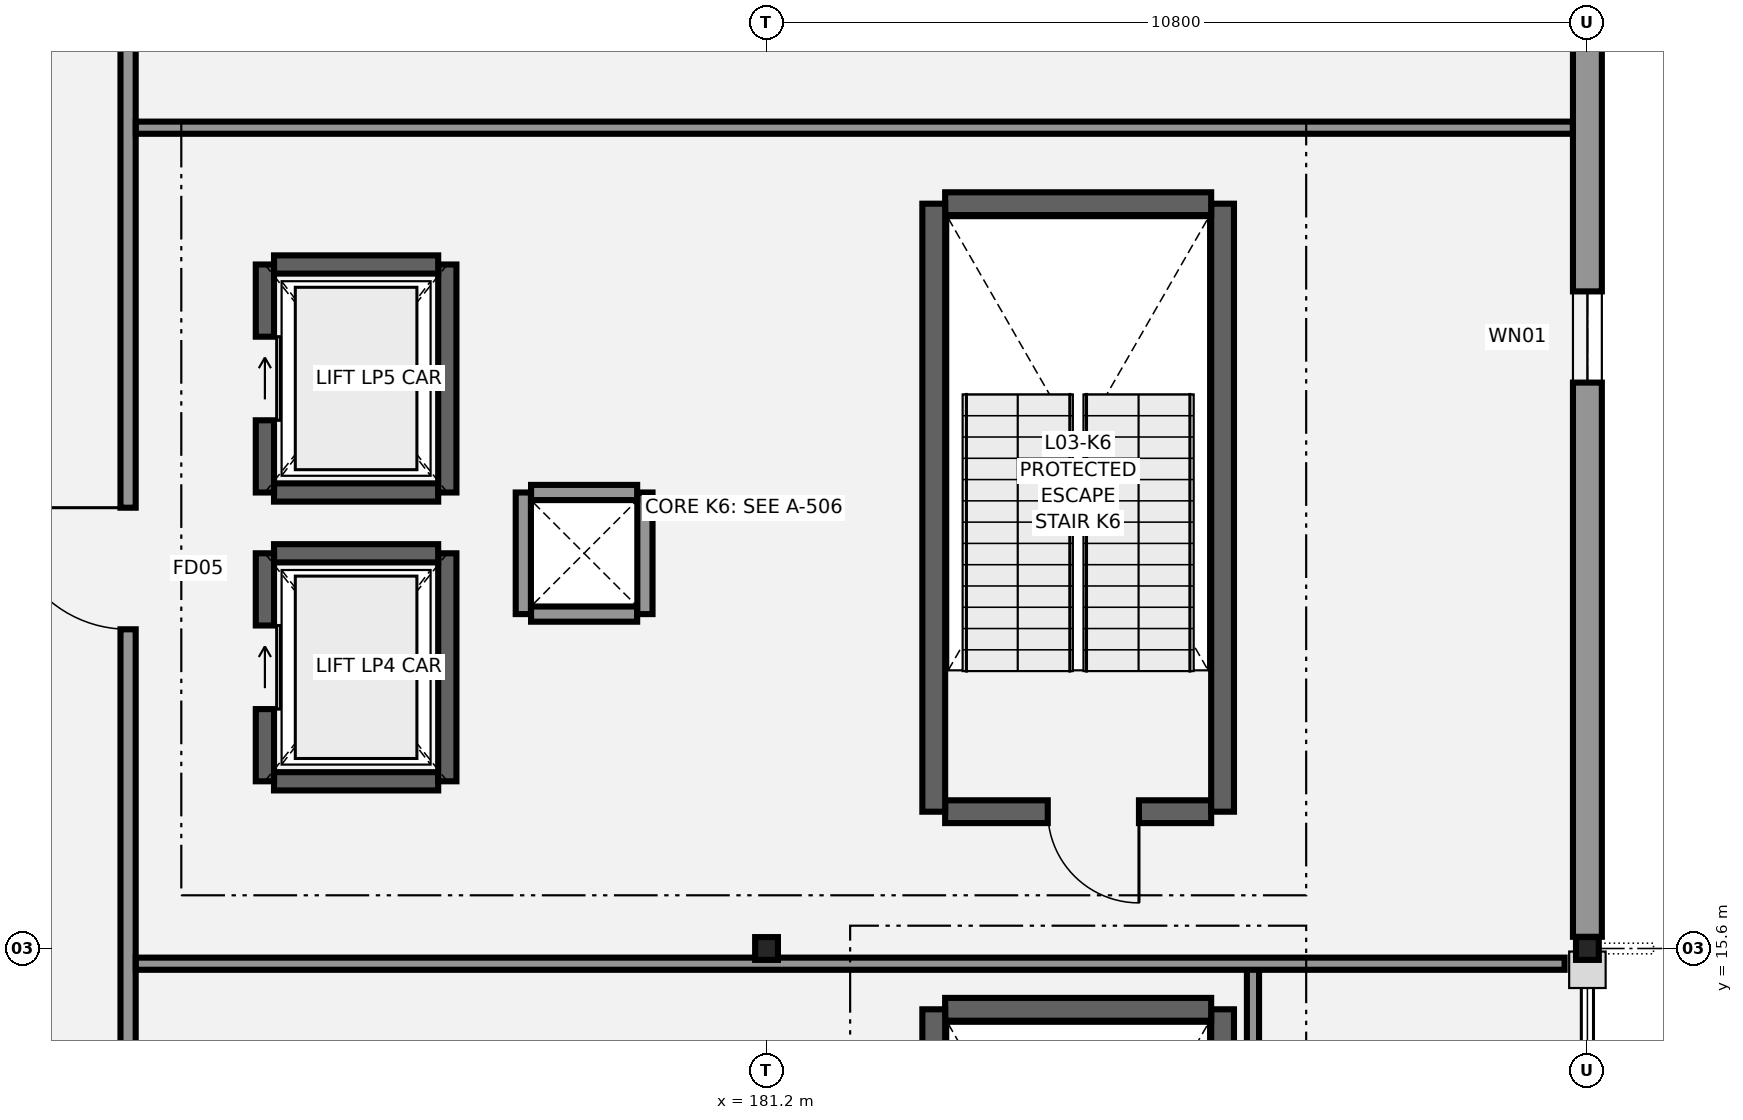
"""IFC4 building model, lengths in metres.
Left out: names, types, materials, properties, quantities, classifications, styles, units other than length and angle.
Written with IfcOpenShell. Run it as: python <this file> out.ifc"""

import sys

from ifc_helpers import new_model, si_unit, direction, frame, frame_2d, origin, origin_2d, place, context, subcontext, project, spatial, rectangle, i_section, extrude, element, fill, save


model = new_model("IFC4")
c1 = context("Model", 3, precision=1e-05, world=origin(), true_north=direction((0.0, 1.0)))
c2 = subcontext(c1, "Body", "Model", "MODEL_VIEW")
j1 = project(units=[si_unit("LENGTHUNIT", "METRE"), si_unit("PLANEANGLEUNIT", "RADIAN")], contexts=[c1])
p1 = place(None, origin())
s1 = spatial("IfcSite", under=j1, at=p1, CompositionType="ELEMENT")
p2 = place(p1, origin())
s2 = spatial("IfcBuilding", under=s1, at=p2, CompositionType="ELEMENT")
p3 = place(p2, frame((0.0, 0.0, 14.4)))
s3 = spatial("IfcBuildingStorey", under=s2, at=p3, CompositionType="ELEMENT", Elevation=14.4)
for number, where, z_axis, x_axis in (
    (1, (181.2, 15.6, 0.0), (0.0, 0.0, 1.0), (1.0, 0.0, 0.0)),
    (2, (192.0, 15.6, 0.0), (0.0, 0.0, 1.0), (1.0, 0.0, 0.0)),
):
    element("IfcColumn", number, at=place(p3, frame(where, z_axis=z_axis, x_axis=x_axis)), inside=s3, PredefinedType="COLUMN", context=c2, shape_type="SweptSolid", body=[
        extrude(i_section(OverallWidth=0.3, OverallDepth=0.3, WebThickness=0.011, FlangeThickness=0.019, FilletRadius=0.027, at=origin_2d()), origin(), (0.0, 0.0, 1.0), 4.2),
    ])
p4 = place(p3, frame((187.2, 6.8, 0.0), z_axis=(0.0, 0.0, 1.0), x_axis=(0.0, 1.0, 0.0)))
e3 = element("IfcWall", 3, at=p4, inside=s3, PredefinedType="SHEAR", context=c2, shape_type="SweptSolid", body=[
    extrude(rectangle(XDim=8.0, YDim=0.3, at=frame_2d((4.0, 0.0))), origin(), (0.0, 0.0, 1.0), 3.98),
])
p5 = place(p3, frame((187.05, 14.8, 0.0), z_axis=(0.0, 0.0, 1.0), x_axis=(-1.0, 0.0, 0.0)))
e4 = element("IfcWall", 4, at=p5, inside=s3, PredefinedType="SHEAR", context=c2, shape_type="SweptSolid", body=[
    extrude(rectangle(XDim=3.5, YDim=0.3, at=frame_2d((1.75, 0.0))), origin(), (0.0, 0.0, 1.0), 3.98),
])
p6 = place(p3, frame((183.4, 14.8, 0.0), z_axis=(0.0, 0.0, 1.0), x_axis=(0.0, -1.0, 0.0)))
e5 = element("IfcWall", 5, at=p6, inside=s3, PredefinedType="SHEAR", context=c2, shape_type="SweptSolid", body=[
    extrude(rectangle(XDim=8.0, YDim=0.3, at=frame_2d((4.0, 0.0))), origin(), (0.0, 0.0, 1.0), 3.98),
])
p7 = place(p3, frame((187.05, 17.4, 0.0), z_axis=(0.0, 0.0, 1.0), x_axis=(-1.0, 0.0, 0.0)))
e6 = element("IfcWall", 6, at=p7, inside=s3, PredefinedType="SHEAR", context=c2, shape_type="SweptSolid", body=[
    extrude(rectangle(XDim=3.5, YDim=0.3, at=frame_2d((1.75, 0.0))), origin(), (0.0, 0.0, 1.0), 3.98),
])
p8 = place(p7, frame((0.95, 0.0, 0.0)))
e7 = element("IfcOpeningElement", 7, at=p8, cuts=e6, PredefinedType="OPENING", context=c2, shape_type="SweptSolid", body=[
    extrude(rectangle(XDim=1.2, YDim=2.2, at=frame_2d((0.6, 1.1))), frame((0.0, 0.16, 0.0), z_axis=(0.0, -1.0, 0.0), x_axis=(1.0, 0.0, 0.0)), (0.0, 0.0, 1.0), 0.32),
])
p9 = place(p3, frame((187.2, 17.4, 0.0), z_axis=(0.0, 0.0, 1.0), x_axis=(0.0, 1.0, 0.0)))
e8 = element("IfcWall", 8, at=p9, inside=s3, PredefinedType="SHEAR", context=c2, shape_type="SweptSolid", body=[
    extrude(rectangle(XDim=8.0, YDim=0.3, at=frame_2d((4.0, 0.0))), origin(), (0.0, 0.0, 1.0), 3.98),
])
p10 = place(p3, frame((187.05, 25.4, 0.0), z_axis=(0.0, 0.0, 1.0), x_axis=(-1.0, 0.0, 0.0)))
e9 = element("IfcWall", 9, at=p10, inside=s3, PredefinedType="SHEAR", context=c2, shape_type="SweptSolid", body=[
    extrude(rectangle(XDim=3.5, YDim=0.3, at=frame_2d((1.75, 0.0))), origin(), (0.0, 0.0, 1.0), 3.98),
])
p11 = place(p3, frame((183.4, 25.4, 0.0), z_axis=(0.0, 0.0, 1.0), x_axis=(0.0, -1.0, 0.0)))
e10 = element("IfcWall", 10, at=p11, inside=s3, PredefinedType="SHEAR", context=c2, shape_type="SweptSolid", body=[
    extrude(rectangle(XDim=8.0, YDim=0.3, at=frame_2d((4.0, 0.0))), origin(), (0.0, 0.0, 1.0), 3.98),
])
p12 = place(p3, frame((174.72, 17.8, 0.0), z_axis=(0.0, 0.0, 1.0), x_axis=(1.0, 0.0, 0.0)))
e11 = element("IfcWall", 11, at=p12, inside=s3, PredefinedType="SHEAR", context=c2, shape_type="SweptSolid", body=[
    extrude(rectangle(XDim=2.16, YDim=0.24, at=frame_2d((1.08, 0.0))), origin(), (0.0, 0.0, 1.0), 3.98),
])
p13 = place(p3, frame((177.0, 17.8, 0.0), z_axis=(0.0, 0.0, 1.0), x_axis=(0.0, 1.0, 0.0)))
e12 = element("IfcWall", 12, at=p13, inside=s3, PredefinedType="SHEAR", context=c2, shape_type="SweptSolid", body=[
    extrude(rectangle(XDim=3.0, YDim=0.24, at=frame_2d((1.5, 0.0))), origin(), (0.0, 0.0, 1.0), 3.98),
])
p14 = place(p3, frame((176.88, 20.8, 0.0), z_axis=(0.0, 0.0, 1.0), x_axis=(-1.0, 0.0, 0.0)))
e13 = element("IfcWall", 13, at=p14, inside=s3, PredefinedType="SHEAR", context=c2, shape_type="SweptSolid", body=[
    extrude(rectangle(XDim=2.16, YDim=0.24, at=frame_2d((1.08, 0.0))), origin(), (0.0, 0.0, 1.0), 3.98),
])
p15 = place(p3, frame((174.6, 20.8, 0.0), z_axis=(0.0, 0.0, 1.0), x_axis=(0.0, -1.0, 0.0)))
e14 = element("IfcWall", 14, at=p15, inside=s3, PredefinedType="SHEAR", context=c2, shape_type="SweptSolid", body=[
    extrude(rectangle(XDim=3.0, YDim=0.24, at=frame_2d((1.5, 0.0))), origin(), (0.0, 0.0, 1.0), 3.98),
])
p16 = place(p15, frame((0.95, 0.0, 0.0)))
e15 = element("IfcOpeningElement", 15, at=p16, cuts=e14, PredefinedType="OPENING", context=c2, shape_type="SweptSolid", body=[
    extrude(rectangle(XDim=1.1, YDim=2.1, at=frame_2d((0.55, 1.05))), frame((0.0, 0.13, 0.0), z_axis=(0.0, -1.0, 0.0), x_axis=(1.0, 0.0, 0.0)), (0.0, 0.0, 1.0), 0.26),
])
p17 = place(p3, frame((174.72, 21.6, 0.0), z_axis=(0.0, 0.0, 1.0), x_axis=(1.0, 0.0, 0.0)))
e16 = element("IfcWall", 16, at=p17, inside=s3, PredefinedType="SHEAR", context=c2, shape_type="SweptSolid", body=[
    extrude(rectangle(XDim=2.16, YDim=0.24, at=frame_2d((1.08, 0.0))), origin(), (0.0, 0.0, 1.0), 3.98),
])
p18 = place(p3, frame((177.0, 21.6, 0.0), z_axis=(0.0, 0.0, 1.0), x_axis=(0.0, 1.0, 0.0)))
e17 = element("IfcWall", 17, at=p18, inside=s3, PredefinedType="SHEAR", context=c2, shape_type="SweptSolid", body=[
    extrude(rectangle(XDim=3.0, YDim=0.24, at=frame_2d((1.5, 0.0))), origin(), (0.0, 0.0, 1.0), 3.98),
])
p19 = place(p3, frame((176.88, 24.6, 0.0), z_axis=(0.0, 0.0, 1.0), x_axis=(-1.0, 0.0, 0.0)))
e18 = element("IfcWall", 18, at=p19, inside=s3, PredefinedType="SHEAR", context=c2, shape_type="SweptSolid", body=[
    extrude(rectangle(XDim=2.16, YDim=0.24, at=frame_2d((1.08, 0.0))), origin(), (0.0, 0.0, 1.0), 3.98),
])
p20 = place(p3, frame((174.6, 24.6, 0.0), z_axis=(0.0, 0.0, 1.0), x_axis=(0.0, -1.0, 0.0)))
e19 = element("IfcWall", 19, at=p20, inside=s3, PredefinedType="SHEAR", context=c2, shape_type="SweptSolid", body=[
    extrude(rectangle(XDim=3.0, YDim=0.24, at=frame_2d((1.5, 0.0))), origin(), (0.0, 0.0, 1.0), 3.98),
])
p21 = place(p20, frame((0.95, 0.0, 0.0)))
e20 = element("IfcOpeningElement", 20, at=p21, cuts=e19, PredefinedType="OPENING", context=c2, shape_type="SweptSolid", body=[
    extrude(rectangle(XDim=1.1, YDim=2.1, at=frame_2d((0.55, 1.05))), frame((0.0, 0.13, 0.0), z_axis=(0.0, -1.0, 0.0), x_axis=(1.0, 0.0, 0.0)), (0.0, 0.0, 1.0), 0.26),
])
p22 = place(p3, frame((192.0, 27.446, 0.0), z_axis=(0.0, 0.0, 1.0), x_axis=(0.0, -1.0, 0.0)))
e21 = element("IfcWall", 21, at=p22, inside=s3, PredefinedType="STANDARD", context=c2, shape_type="SweptSolid", body=[
    extrude(rectangle(XDim=11.692, YDim=0.38, at=frame_2d((5.846, 0.0))), origin(), (0.0, 0.0, 1.0), 3.685),
])
p23 = place(p22, frame((3.2, 0.0, 0.8)))
e22 = element("IfcOpeningElement", 22, at=p23, cuts=e21, PredefinedType="OPENING", context=c2, shape_type="SweptSolid", body=[
    extrude(rectangle(XDim=1.2, YDim=1.8, at=frame_2d((0.6, 0.9))), frame((0.0, 0.2, 0.0), z_axis=(0.0, -1.0, 0.0), x_axis=(1.0, 0.0, 0.0)), (0.0, 0.0, 1.0), 0.4),
])
p24 = place(p3, frame((172.8, 6.8, 0.0), z_axis=(0.0, 0.0, 1.0), x_axis=(0.0, 1.0, 0.0)))
e23 = element("IfcWall", 23, at=p24, inside=s3, PredefinedType="PARTITIONING", context=c2, shape_type="SweptSolid", body=[
    extrude(rectangle(XDim=32.628, YDim=0.2, at=frame_2d((16.314, 0.0))), origin(), (0.0, 0.0, 1.0), 3.84),
])
p25 = place(p24, frame((3.2, 0.0, 0.0)))
e24 = element("IfcOpeningElement", 24, at=p25, cuts=e23, PredefinedType="OPENING", context=c2, shape_type="SweptSolid", body=[
    extrude(rectangle(XDim=1.05, YDim=2.15, at=frame_2d((0.525, 1.075))), frame((0.0, 0.11, 0.0), z_axis=(0.0, -1.0, 0.0), x_axis=(1.0, 0.0, 0.0)), (0.0, 0.0, 1.0), 0.22),
])
p26 = place(p24, frame((13.0, 0.0, 0.0)))
e25 = element("IfcOpeningElement", 25, at=p26, cuts=e23, PredefinedType="OPENING", context=c2, shape_type="SweptSolid", body=[
    extrude(rectangle(XDim=1.6, YDim=2.2, at=frame_2d((0.8, 1.1))), frame((0.0, 0.11, 0.0), z_axis=(0.0, -1.0, 0.0), x_axis=(1.0, 0.0, 0.0)), (0.0, 0.0, 1.0), 0.22),
])
p27 = place(p24, frame((22.8, 0.0, 0.0)))
e26 = element("IfcOpeningElement", 26, at=p27, cuts=e23, PredefinedType="OPENING", context=c2, shape_type="SweptSolid", body=[
    extrude(rectangle(XDim=1.15, YDim=2.15, at=frame_2d((0.575, 1.075))), frame((0.0, 0.11, 0.0), z_axis=(0.0, -1.0, 0.0), x_axis=(1.0, 0.0, 0.0)), (0.0, 0.0, 1.0), 0.22),
])
p28 = place(p24, frame((29.2, 0.0, 0.0)))
e27 = element("IfcOpeningElement", 27, at=p28, cuts=e23, PredefinedType="OPENING", context=c2, shape_type="SweptSolid", body=[
    extrude(rectangle(XDim=1.02, YDim=2.12, at=frame_2d((0.51, 1.06))), frame((0.0, 0.11, 0.0), z_axis=(0.0, -1.0, 0.0), x_axis=(1.0, 0.0, 0.0)), (0.0, 0.0, 1.0), 0.22),
])
p29 = place(p24, frame((4.6, 0.0, 1.05)))
e28 = element("IfcOpeningElement", 28, at=p29, cuts=e23, PredefinedType="OPENING", context=c2, shape_type="SweptSolid", body=[
    extrude(rectangle(XDim=2.8, YDim=1.3, at=frame_2d((1.4, 0.65))), frame((0.0, 0.11, 0.0), z_axis=(0.0, -1.0, 0.0), x_axis=(1.0, 0.0, 0.0)), (0.0, 0.0, 1.0), 0.22),
])
p30 = place(p3, frame((187.6, 4.482, 0.0), z_axis=(0.0, 0.0, 1.0), x_axis=(0.0, 1.0, 0.0)))
e29 = element("IfcWall", 29, at=p30, inside=s3, PredefinedType="PARTITIONING", context=c2, shape_type="SweptSolid", body=[
    extrude(rectangle(XDim=10.918, YDim=0.16, at=frame_2d((5.459, 0.0))), origin(), (0.0, 0.0, 1.0), 3.84),
])
p31 = place(p3, frame((172.902, 15.4, 0.0), z_axis=(0.0, 0.0, 1.0), x_axis=(1.0, 0.0, 0.0)))
e30 = element("IfcWall", 30, at=p31, inside=s3, PredefinedType="PARTITIONING", context=c2, shape_type="SweptSolid", body=[
    extrude(rectangle(XDim=18.798, YDim=0.16, at=frame_2d((9.399, 0.0))), origin(), (0.0, 0.0, 1.0), 3.535),
])
p32 = place(p3, frame((172.902, 26.4, 0.0), z_axis=(0.0, 0.0, 1.0), x_axis=(1.0, 0.0, 0.0)))
e31 = element("IfcWall", 31, at=p32, inside=s3, PredefinedType="PARTITIONING", context=c2, shape_type="SweptSolid", body=[
    extrude(rectangle(XDim=18.906, YDim=0.16, at=frame_2d((9.453, 0.0))), origin(), (0.0, 0.0, 1.0), 3.84),
])
p33 = place(p3, frame((178.102, 20.0, 0.0), z_axis=(0.0, 0.0, 1.0), x_axis=(1.0, 0.0, 0.0)))
e32 = element("IfcWall", 32, at=p33, inside=s3, PredefinedType="PARTITIONING", context=c2, shape_type="SweptSolid", body=[
    extrude(rectangle(XDim=1.396, YDim=0.2, at=frame_2d((0.698, 0.0))), origin(), (0.0, 0.0, 1.0), 3.84),
])
p34 = place(p3, frame((179.6, 20.0, 0.0), z_axis=(0.0, 0.0, 1.0), x_axis=(0.0, 1.0, 0.0)))
e33 = element("IfcWall", 33, at=p34, inside=s3, PredefinedType="PARTITIONING", context=c2, shape_type="SweptSolid", body=[
    extrude(rectangle(XDim=1.6, YDim=0.2, at=frame_2d((0.8, 0.0))), origin(), (0.0, 0.0, 1.0), 3.84),
])
p35 = place(p3, frame((179.498, 21.6, 0.0), z_axis=(0.0, 0.0, 1.0), x_axis=(-1.0, 0.0, 0.0)))
e34 = element("IfcWall", 34, at=p35, inside=s3, PredefinedType="PARTITIONING", context=c2, shape_type="SweptSolid", body=[
    extrude(rectangle(XDim=1.396, YDim=0.2, at=frame_2d((0.698, 0.0))), origin(), (0.0, 0.0, 1.0), 3.84),
])
p36 = place(p3, frame((178.0, 21.6, 0.0), z_axis=(0.0, 0.0, 1.0), x_axis=(0.0, -1.0, 0.0)))
e35 = element("IfcWall", 35, at=p36, inside=s3, PredefinedType="PARTITIONING", context=c2, shape_type="SweptSolid", body=[
    extrude(rectangle(XDim=1.6, YDim=0.2, at=frame_2d((0.8, 0.0))), origin(), (0.0, 0.0, 1.0), 3.84),
])
p37 = place(p23, origin())
e36 = element("IfcWindow", 36, at=p37, inside=s3, PartitioningType="SINGLE_PANEL", PredefinedType="WINDOW", context=c2, shape_type="SweptSolid", body=[
    extrude(rectangle(XDim=1.2, YDim=1.8, at=frame_2d((0.6, 0.9))), frame((0.0, 0.03, 0.0), z_axis=(0.0, -1.0, 0.0), x_axis=(1.0, 0.0, 0.0)), (0.0, 0.0, 1.0), 0.06),
])
fill(e22, e36)
p38 = place(p26, origin())
e37 = element("IfcDoor", 37, at=p38, inside=s3, OperationType="SINGLE_SWING_RIGHT", PredefinedType="DOOR", context=c2, shape_type="SweptSolid", body=[
    extrude(rectangle(XDim=1.6, YDim=2.2, at=frame_2d((0.8, 1.1))), frame((0.0, 0.025, 0.0), z_axis=(0.0, -1.0, 0.0), x_axis=(1.0, 0.0, 0.0)), (0.0, 0.0, 1.0), 0.05),
])
fill(e25, e37)
p39 = place(p8, origin())
e38 = element("IfcDoor", 38, at=p39, inside=s3, OperationType="SINGLE_SWING_LEFT", PredefinedType="DOOR", context=c2, shape_type="SweptSolid", body=[
    extrude(rectangle(XDim=1.2, YDim=2.2, at=frame_2d((0.6, 1.1))), frame((0.0, 0.025, 0.0), z_axis=(0.0, -1.0, 0.0), x_axis=(1.0, 0.0, 0.0)), (0.0, 0.0, 1.0), 0.05),
])
fill(e7, e38)
p40 = place(p16, origin())
e39 = element("IfcDoor", 39, at=p40, inside=s3, OperationType="SLIDING_TO_LEFT", PredefinedType="DOOR", context=c2, shape_type="SweptSolid", body=[
    extrude(rectangle(XDim=1.1, YDim=2.1, at=frame_2d((0.55, 1.05))), frame((0.0, 0.025, 0.0), z_axis=(0.0, -1.0, 0.0), x_axis=(1.0, 0.0, 0.0)), (0.0, 0.0, 1.0), 0.05),
])
fill(e15, e39)
p41 = place(p21, origin())
e40 = element("IfcDoor", 40, at=p41, inside=s3, OperationType="SLIDING_TO_LEFT", PredefinedType="DOOR", context=c2, shape_type="SweptSolid", body=[
    extrude(rectangle(XDim=1.1, YDim=2.1, at=frame_2d((0.55, 1.05))), frame((0.0, 0.025, 0.0), z_axis=(0.0, -1.0, 0.0), x_axis=(1.0, 0.0, 0.0)), (0.0, 0.0, 1.0), 0.05),
])
fill(e20, e40)
save(model, sys.argv[1])
